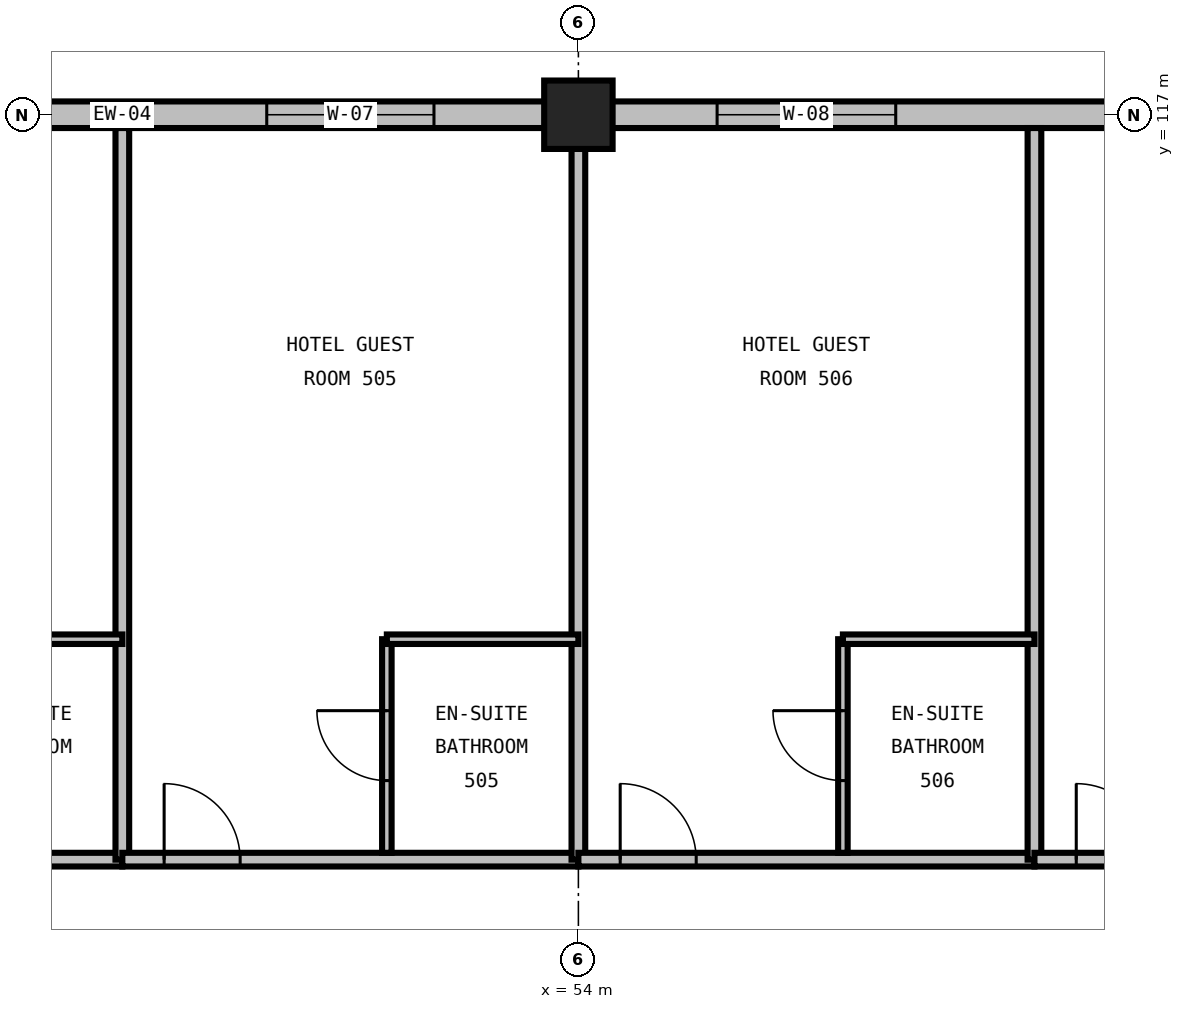
"""IFC4 building model, lengths in metres.
Left out: names, types, materials, properties, quantities, classifications, styles, units other than length and angle.
Written with IfcOpenShell. Run it as: python <this file> out.ifc"""

import sys

from ifc_helpers import new_model, si_unit, direction, frame, frame_2d, origin, origin_2d, place, context, subcontext, project, spatial, rectangle, extrude, element, fill, save


model = new_model("IFC4")
c1 = context("Model", 3, precision=1e-05, world=origin(), true_north=direction((0.0, 1.0)))
c2 = subcontext(c1, "Body", "Model", "MODEL_VIEW")
j1 = project(units=[si_unit("LENGTHUNIT", "METRE"), si_unit("PLANEANGLEUNIT", "RADIAN")], contexts=[c1])
p1 = place(None, origin())
s1 = spatial("IfcSite", under=j1, at=p1, CompositionType="ELEMENT")
p2 = place(p1, origin())
s2 = spatial("IfcBuilding", under=s1, at=p2, CompositionType="ELEMENT")
p3 = place(p2, frame((0.0, 0.0, 27.6)))
s3 = spatial("IfcBuildingStorey", under=s2, at=p3, CompositionType="ELEMENT", Elevation=27.6)
p4 = place(p3, frame((54.0, 117.0, 0.0), z_axis=(0.0, 0.0, 1.0), x_axis=(1.0, 0.0, 0.0)))
e1 = element("IfcColumn", 1, at=p4, inside=s3, PredefinedType="COLUMN", context=c2, shape_type="SweptSolid", body=[
    extrude(rectangle(XDim=0.9, YDim=0.9, at=origin_2d()), origin(), (0.0, 0.0, 1.0), 3.6),
])
p5 = place(p3, frame((54.0, 117.0, 0.0), z_axis=(0.0, 0.0, 1.0), x_axis=(-1.0, 0.0, 0.0)))
e2 = element("IfcWall", 2, at=p5, inside=s3, PredefinedType="STANDARD", context=c2, shape_type="SweptSolid", body=[
    extrude(rectangle(XDim=12.0, YDim=0.35, at=frame_2d((6.0, 0.0))), origin(), (0.0, 0.0, 1.0), 2.486),
])
p6 = place(p5, frame((1.9, 0.0, 0.75)))
e3 = element("IfcOpeningElement", 3, at=p6, cuts=e2, PredefinedType="OPENING", context=c2, shape_type="SweptSolid", body=[
    extrude(rectangle(XDim=2.2, YDim=1.6, at=frame_2d((1.1, 0.8))), frame((0.0, 0.19, 0.0), z_axis=(0.0, -1.0, 0.0), x_axis=(1.0, 0.0, 0.0)), (0.0, 0.0, 1.0), 0.38),
])
p7 = place(p5, frame((7.825, 0.0, 0.75)))
e4 = element("IfcOpeningElement", 4, at=p7, cuts=e2, PredefinedType="OPENING", context=c2, shape_type="SweptSolid", body=[
    extrude(rectangle(XDim=2.35, YDim=1.6, at=frame_2d((1.175, 0.8))), frame((0.0, 0.19, 0.0), z_axis=(0.0, -1.0, 0.0), x_axis=(1.0, 0.0, 0.0)), (0.0, 0.0, 1.0), 0.38),
])
p8 = place(p3, frame((66.0, 117.0, 0.0), z_axis=(0.0, 0.0, 1.0), x_axis=(-1.0, 0.0, 0.0)))
e5 = element("IfcWall", 5, at=p8, inside=s3, PredefinedType="STANDARD", context=c2, shape_type="SweptSolid", body=[
    extrude(rectangle(XDim=12.0, YDim=0.35, at=frame_2d((6.0, 0.0))), origin(), (0.0, 0.0, 1.0), 2.486),
])
p9 = place(p8, frame((1.9, 0.0, 0.75)))
e6 = element("IfcOpeningElement", 6, at=p9, cuts=e5, PredefinedType="OPENING", context=c2, shape_type="SweptSolid", body=[
    extrude(rectangle(XDim=2.2, YDim=1.6, at=frame_2d((1.1, 0.8))), frame((0.0, 0.19, 0.0), z_axis=(0.0, -1.0, 0.0), x_axis=(1.0, 0.0, 0.0)), (0.0, 0.0, 1.0), 0.38),
])
p10 = place(p8, frame((7.825, 0.0, 0.75)))
e7 = element("IfcOpeningElement", 7, at=p10, cuts=e5, PredefinedType="OPENING", context=c2, shape_type="SweptSolid", body=[
    extrude(rectangle(XDim=2.35, YDim=1.6, at=frame_2d((1.175, 0.8))), frame((0.0, 0.19, 0.0), z_axis=(0.0, -1.0, 0.0), x_axis=(1.0, 0.0, 0.0)), (0.0, 0.0, 1.0), 0.38),
])
p11 = place(p3, frame((42.0, 107.2, 0.0), z_axis=(0.0, 0.0, 1.0), x_axis=(1.0, 0.0, 0.0)))
e8 = element("IfcWall", 8, at=p11, inside=s3, PredefinedType="PARTITIONING", context=c2, shape_type="SweptSolid", body=[
    extrude(rectangle(XDim=6.0, YDim=0.18, at=frame_2d((3.0, 0.0))), origin(), (0.0, 0.0, 1.0), 3.29),
])
p12 = place(p11, frame((0.55, 0.0, 0.0)))
e9 = element("IfcOpeningElement", 9, at=p12, cuts=e8, PredefinedType="OPENING", context=c2, shape_type="SweptSolid", body=[
    extrude(rectangle(XDim=1.0, YDim=2.15, at=frame_2d((0.5, 1.075))), frame((0.0, 0.105, 0.0), z_axis=(0.0, -1.0, 0.0), x_axis=(1.0, 0.0, 0.0)), (0.0, 0.0, 1.0), 0.21),
])
p13 = place(p3, frame((48.0, 107.2, 0.0), z_axis=(0.0, 0.0, 1.0), x_axis=(0.0, 1.0, 0.0)))
e10 = element("IfcWall", 10, at=p13, inside=s3, PredefinedType="PARTITIONING", context=c2, shape_type="SweptSolid", body=[
    extrude(rectangle(XDim=9.625, YDim=0.18, at=frame_2d((4.812, 0.0))), origin(), (0.0, 0.0, 1.0), 3.29),
])
p14 = place(p3, frame((45.48, 110.1, 0.0), z_axis=(0.0, 0.0, 1.0), x_axis=(1.0, 0.0, 0.0)))
e11 = element("IfcWall", 11, at=p14, inside=s3, PredefinedType="PARTITIONING", context=c2, shape_type="SweptSolid", body=[
    extrude(rectangle(XDim=2.52, YDim=0.125, at=frame_2d((1.26, 0.0))), origin(), (0.0, 0.0, 1.0), 3.29),
])
p15 = place(p3, frame((48.0, 107.2, 0.0), z_axis=(0.0, 0.0, 1.0), x_axis=(1.0, 0.0, 0.0)))
e12 = element("IfcWall", 12, at=p15, inside=s3, PredefinedType="PARTITIONING", context=c2, shape_type="SweptSolid", body=[
    extrude(rectangle(XDim=6.0, YDim=0.18, at=frame_2d((3.0, 0.0))), origin(), (0.0, 0.0, 1.0), 3.29),
])
p16 = place(p15, frame((0.55, 0.0, 0.0)))
e13 = element("IfcOpeningElement", 13, at=p16, cuts=e12, PredefinedType="OPENING", context=c2, shape_type="SweptSolid", body=[
    extrude(rectangle(XDim=1.0, YDim=2.15, at=frame_2d((0.5, 1.075))), frame((0.0, 0.105, 0.0), z_axis=(0.0, -1.0, 0.0), x_axis=(1.0, 0.0, 0.0)), (0.0, 0.0, 1.0), 0.21),
])
p17 = place(p3, frame((54.0, 107.2, 0.0), z_axis=(0.0, 0.0, 1.0), x_axis=(0.0, 1.0, 0.0)))
e14 = element("IfcWall", 14, at=p17, inside=s3, PredefinedType="PARTITIONING", context=c2, shape_type="SweptSolid", body=[
    extrude(rectangle(XDim=9.625, YDim=0.18, at=frame_2d((4.812, 0.0))), origin(), (0.0, 0.0, 1.0), 2.59),
])
p18 = place(p3, frame((51.48, 107.29, 0.0), z_axis=(0.0, 0.0, 1.0), x_axis=(0.0, 1.0, 0.0)))
e15 = element("IfcWall", 15, at=p18, inside=s3, PredefinedType="PARTITIONING", context=c2, shape_type="SweptSolid", body=[
    extrude(rectangle(XDim=2.81, YDim=0.125, at=frame_2d((1.405, 0.0))), origin(), (0.0, 0.0, 1.0), 3.29),
])
p19 = place(p18, frame((0.95, 0.0, 0.0)))
e16 = element("IfcOpeningElement", 16, at=p19, cuts=e15, PredefinedType="OPENING", context=c2, shape_type="SweptSolid", body=[
    extrude(rectangle(XDim=0.92, YDim=2.1, at=frame_2d((0.46, 1.05))), frame((0.0, 0.077, 0.0), z_axis=(0.0, -1.0, 0.0), x_axis=(1.0, 0.0, 0.0)), (0.0, 0.0, 1.0), 0.155),
])
p20 = place(p3, frame((51.48, 110.1, 0.0), z_axis=(0.0, 0.0, 1.0), x_axis=(1.0, 0.0, 0.0)))
e17 = element("IfcWall", 17, at=p20, inside=s3, PredefinedType="PARTITIONING", context=c2, shape_type="SweptSolid", body=[
    extrude(rectangle(XDim=2.52, YDim=0.125, at=frame_2d((1.26, 0.0))), origin(), (0.0, 0.0, 1.0), 3.29),
])
p21 = place(p3, frame((54.0, 107.2, 0.0), z_axis=(0.0, 0.0, 1.0), x_axis=(1.0, 0.0, 0.0)))
e18 = element("IfcWall", 18, at=p21, inside=s3, PredefinedType="PARTITIONING", context=c2, shape_type="SweptSolid", body=[
    extrude(rectangle(XDim=6.0, YDim=0.18, at=frame_2d((3.0, 0.0))), origin(), (0.0, 0.0, 1.0), 3.29),
])
p22 = place(p21, frame((0.55, 0.0, 0.0)))
e19 = element("IfcOpeningElement", 19, at=p22, cuts=e18, PredefinedType="OPENING", context=c2, shape_type="SweptSolid", body=[
    extrude(rectangle(XDim=1.0, YDim=2.15, at=frame_2d((0.5, 1.075))), frame((0.0, 0.105, 0.0), z_axis=(0.0, -1.0, 0.0), x_axis=(1.0, 0.0, 0.0)), (0.0, 0.0, 1.0), 0.21),
])
p23 = place(p3, frame((60.0, 107.2, 0.0), z_axis=(0.0, 0.0, 1.0), x_axis=(0.0, 1.0, 0.0)))
e20 = element("IfcWall", 20, at=p23, inside=s3, PredefinedType="PARTITIONING", context=c2, shape_type="SweptSolid", body=[
    extrude(rectangle(XDim=9.625, YDim=0.18, at=frame_2d((4.812, 0.0))), origin(), (0.0, 0.0, 1.0), 3.29),
])
p24 = place(p3, frame((57.48, 107.29, 0.0), z_axis=(0.0, 0.0, 1.0), x_axis=(0.0, 1.0, 0.0)))
e21 = element("IfcWall", 21, at=p24, inside=s3, PredefinedType="PARTITIONING", context=c2, shape_type="SweptSolid", body=[
    extrude(rectangle(XDim=2.81, YDim=0.125, at=frame_2d((1.405, 0.0))), origin(), (0.0, 0.0, 1.0), 3.29),
])
p25 = place(p24, frame((0.95, 0.0, 0.0)))
e22 = element("IfcOpeningElement", 22, at=p25, cuts=e21, PredefinedType="OPENING", context=c2, shape_type="SweptSolid", body=[
    extrude(rectangle(XDim=0.92, YDim=2.1, at=frame_2d((0.46, 1.05))), frame((0.0, 0.077, 0.0), z_axis=(0.0, -1.0, 0.0), x_axis=(1.0, 0.0, 0.0)), (0.0, 0.0, 1.0), 0.155),
])
p26 = place(p3, frame((57.48, 110.1, 0.0), z_axis=(0.0, 0.0, 1.0), x_axis=(1.0, 0.0, 0.0)))
e23 = element("IfcWall", 23, at=p26, inside=s3, PredefinedType="PARTITIONING", context=c2, shape_type="SweptSolid", body=[
    extrude(rectangle(XDim=2.52, YDim=0.125, at=frame_2d((1.26, 0.0))), origin(), (0.0, 0.0, 1.0), 3.29),
])
p27 = place(p3, frame((60.0, 107.2, 0.0), z_axis=(0.0, 0.0, 1.0), x_axis=(1.0, 0.0, 0.0)))
e24 = element("IfcWall", 24, at=p27, inside=s3, PredefinedType="PARTITIONING", context=c2, shape_type="SweptSolid", body=[
    extrude(rectangle(XDim=6.0, YDim=0.18, at=frame_2d((3.0, 0.0))), origin(), (0.0, 0.0, 1.0), 3.29),
])
p28 = place(p27, frame((0.55, 0.0, 0.0)))
e25 = element("IfcOpeningElement", 25, at=p28, cuts=e24, PredefinedType="OPENING", context=c2, shape_type="SweptSolid", body=[
    extrude(rectangle(XDim=1.0, YDim=2.15, at=frame_2d((0.5, 1.075))), frame((0.0, 0.105, 0.0), z_axis=(0.0, -1.0, 0.0), x_axis=(1.0, 0.0, 0.0)), (0.0, 0.0, 1.0), 0.21),
])
p29 = place(p6, origin())
e26 = element("IfcWindow", 26, at=p29, inside=s3, PartitioningType="DOUBLE_PANEL_VERTICAL", PredefinedType="WINDOW", context=c2, shape_type="SweptSolid", body=[
    extrude(rectangle(XDim=2.2, YDim=1.6, at=frame_2d((1.1, 0.8))), frame((0.0, 0.03, 0.0), z_axis=(0.0, -1.0, 0.0), x_axis=(1.0, 0.0, 0.0)), (0.0, 0.0, 1.0), 0.06),
])
fill(e3, e26)
p30 = place(p10, origin())
e27 = element("IfcWindow", 27, at=p30, inside=s3, PartitioningType="DOUBLE_PANEL_VERTICAL", PredefinedType="WINDOW", context=c2, shape_type="SweptSolid", body=[
    extrude(rectangle(XDim=2.35, YDim=1.6, at=frame_2d((1.175, 0.8))), frame((0.0, 0.03, 0.0), z_axis=(0.0, -1.0, 0.0), x_axis=(1.0, 0.0, 0.0)), (0.0, 0.0, 1.0), 0.06),
])
fill(e7, e27)
p31 = place(p16, origin())
e28 = element("IfcDoor", 28, at=p31, inside=s3, OperationType="SINGLE_SWING_LEFT", PredefinedType="DOOR", context=c2, shape_type="SweptSolid", body=[
    extrude(rectangle(XDim=1.0, YDim=2.15, at=frame_2d((0.5, 1.075))), frame((0.0, 0.025, 0.0), z_axis=(0.0, -1.0, 0.0), x_axis=(1.0, 0.0, 0.0)), (0.0, 0.0, 1.0), 0.05),
])
fill(e13, e28)
p32 = place(p19, origin())
e29 = element("IfcDoor", 29, at=p32, inside=s3, OperationType="SINGLE_SWING_RIGHT", PredefinedType="DOOR", context=c2, shape_type="SweptSolid", body=[
    extrude(rectangle(XDim=0.92, YDim=2.1, at=frame_2d((0.46, 1.05))), frame((0.0, 0.025, 0.0), z_axis=(0.0, -1.0, 0.0), x_axis=(1.0, 0.0, 0.0)), (0.0, 0.0, 1.0), 0.05),
])
fill(e16, e29)
p33 = place(p22, origin())
e30 = element("IfcDoor", 30, at=p33, inside=s3, OperationType="SINGLE_SWING_LEFT", PredefinedType="DOOR", context=c2, shape_type="SweptSolid", body=[
    extrude(rectangle(XDim=1.0, YDim=2.15, at=frame_2d((0.5, 1.075))), frame((0.0, 0.025, 0.0), z_axis=(0.0, -1.0, 0.0), x_axis=(1.0, 0.0, 0.0)), (0.0, 0.0, 1.0), 0.05),
])
fill(e19, e30)
p34 = place(p25, origin())
e31 = element("IfcDoor", 31, at=p34, inside=s3, OperationType="SINGLE_SWING_RIGHT", PredefinedType="DOOR", context=c2, shape_type="SweptSolid", body=[
    extrude(rectangle(XDim=0.92, YDim=2.1, at=frame_2d((0.46, 1.05))), frame((0.0, 0.025, 0.0), z_axis=(0.0, -1.0, 0.0), x_axis=(1.0, 0.0, 0.0)), (0.0, 0.0, 1.0), 0.05),
])
fill(e22, e31)
p35 = place(p28, origin())
e32 = element("IfcDoor", 32, at=p35, inside=s3, OperationType="SINGLE_SWING_LEFT", PredefinedType="DOOR", context=c2, shape_type="SweptSolid", body=[
    extrude(rectangle(XDim=1.0, YDim=2.15, at=frame_2d((0.5, 1.075))), frame((0.0, 0.025, 0.0), z_axis=(0.0, -1.0, 0.0), x_axis=(1.0, 0.0, 0.0)), (0.0, 0.0, 1.0), 0.05),
])
fill(e25, e32)
save(model, sys.argv[1])
